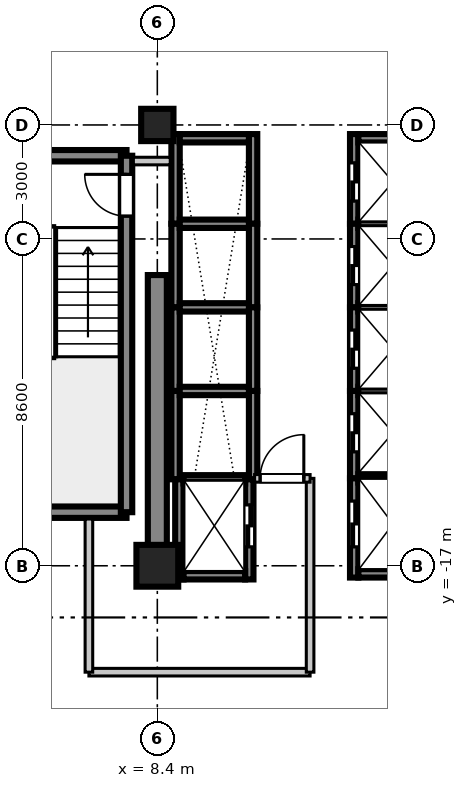
"""IFC4 building model, lengths in metres.
Left out: names, types, materials, properties, quantities, classifications, styles, units other than length and angle.
Written with IfcOpenShell. Run it as: python <this file> out.ifc"""

import sys

from ifc_helpers import new_model, si_unit, direction, frame, frame_2d, origin, origin_2d, place, context, subcontext, project, spatial, rectangle, extrude, source, transform, mapped, element, fill, save


model = new_model("IFC4")
c1 = context("Model", 3, precision=1e-05, world=origin(), true_north=direction((0.0, 1.0)))
c2 = subcontext(c1, "Body", "Model", "MODEL_VIEW")
j1 = project(units=[si_unit("LENGTHUNIT", "METRE"), si_unit("PLANEANGLEUNIT", "RADIAN")], contexts=[c1])
p1 = place(None, origin())
s1 = spatial("IfcSite", under=j1, at=p1, CompositionType="ELEMENT")
p2 = place(p1, origin())
s2 = spatial("IfcBuilding", under=s1, at=p2, CompositionType="ELEMENT")
p3 = place(p2, frame((0.0, 0.0, 149.0)))
s3 = spatial("IfcBuildingStorey", under=s2, at=p3, CompositionType="ELEMENT", Elevation=149.0)
m1 = source(origin(), c2, "Body", "SweptSolid", [
    extrude(rectangle(XDim=1.1, YDim=1.1, at=origin_2d()), origin(), (0.0, 0.0, 1.0), 3.605),
])
p4 = place(p3, frame((8.4, -17.0, 0.0), z_axis=(0.0, 0.0, 1.0), x_axis=(1.0, 0.0, 0.0)))
e1 = element("IfcColumn", 1, at=p4, inside=s3, PredefinedType="COLUMN", context=c2, shape_type="MappedRepresentation", body=[
    mapped(m1, transform((0.0, 0.0, 0.0), scale=1.0)),
])
m2 = source(origin(), c2, "Body", "SweptSolid", [
    extrude(rectangle(XDim=0.85, YDim=0.85, at=origin_2d()), origin(), (0.0, 0.0, 1.0), 3.605),
])
p5 = place(p3, frame((8.4, -5.4, 0.0), z_axis=(0.0, 0.0, 1.0), x_axis=(1.0, 0.0, 0.0)))
e2 = element("IfcColumn", 2, at=p5, inside=s3, PredefinedType="PILASTER", context=c2, shape_type="MappedRepresentation", body=[
    mapped(m2, transform((0.0, 0.0, 0.0), scale=1.0)),
])
m3 = source(origin(), c2, "Body", "SweptSolid", [
    extrude(rectangle(XDim=7.65, YDim=0.5, at=frame_2d((3.825, 0.0))), origin(), (0.0, 0.0, 1.0), 3.39),
])
p6 = place(p3, frame((8.4, -17.0, 0.0), z_axis=(0.0, 0.0, 1.0), x_axis=(0.0, 1.0, 0.0)))
e3 = element("IfcWall", 3, at=p6, inside=s3, PredefinedType="SHEAR", context=c2, shape_type="MappedRepresentation", body=[
    mapped(m3, transform((0.0, 0.0, 0.0), scale=1.0)),
])
m4 = source(origin(), c2, "Body", "SweptSolid", [
    extrude(rectangle(XDim=3.98, YDim=0.3, at=frame_2d((1.99, 0.0))), origin(), (0.0, 0.0, 1.0), 3.39),
])
for number, where, z_axis, x_axis in (
    (4, (3.61, -15.59, 0.0), (0.0, 0.0, 1.0), (1.0, 0.0, 0.0)),
    (5, (3.61, -6.21, 0.0), (0.0, 0.0, 1.0), (1.0, 0.0, 0.0)),
):
    element("IfcWall", number, at=place(p3, frame(where, z_axis=z_axis, x_axis=x_axis)), inside=s3, PredefinedType="SHEAR", context=c2, shape_type="MappedRepresentation", body=[
        mapped(m4, transform((0.0, 0.0, 0.0), scale=1.0)),
    ])
m5 = source(origin(), c2, "Body", "SweptSolid", [
    extrude(rectangle(XDim=9.38, YDim=0.3, at=frame_2d((4.69, 0.0))), origin(), (0.0, 0.0, 1.0), 3.39),
])
p7 = place(p3, frame((7.59, -15.59, 0.0), z_axis=(0.0, 0.0, 1.0), x_axis=(0.0, 1.0, 0.0)))
e6 = element("IfcWall", 6, at=p7, inside=s3, PredefinedType="SHEAR", context=c2, shape_type="MappedRepresentation", body=[
    mapped(m5, transform((0.0, 0.0, 0.0), scale=1.0)),
])
p8 = place(p7, frame((7.79, 0.0, 0.0)))
e7 = element("IfcOpeningElement", 7, at=p8, cuts=e6, PredefinedType="OPENING", context=c2, shape_type="SweptSolid", body=[
    extrude(rectangle(XDim=1.1, YDim=2.15, at=frame_2d((0.55, 1.075))), frame((0.0, 0.16, 0.0), z_axis=(0.0, -1.0, 0.0), x_axis=(1.0, 0.0, 0.0)), (0.0, 0.0, 1.0), 0.32),
])
m6 = source(origin(), c2, "Body", "SweptSolid", [
    extrude(rectangle(XDim=2.36, YDim=0.22, at=frame_2d((1.18, 0.0))), origin(), (0.0, 0.0, 1.0), 3.39),
])
p9 = place(p3, frame((13.58, -8.0, 0.0), z_axis=(0.0, 0.0, 1.0), x_axis=(0.0, 1.0, 0.0)))
e8 = element("IfcWall", 8, at=p9, inside=s3, PredefinedType="SHEAR", context=c2, shape_type="MappedRepresentation", body=[
    mapped(m6, transform((0.0, 0.0, 0.0), scale=1.0)),
])
p10 = place(p9, frame((0.6, 0.0, 0.0)))
e9 = element("IfcOpeningElement", 9, at=p10, cuts=e8, PredefinedType="OPENING", context=c2, shape_type="SweptSolid", body=[
    extrude(rectangle(XDim=1.0, YDim=2.2, at=frame_2d((0.5, 1.1))), frame((0.0, 0.12, 0.0), z_axis=(0.0, -1.0, 0.0), x_axis=(1.0, 0.0, 0.0)), (0.0, 0.0, 1.0), 0.24),
])
m7 = source(origin(), c2, "Body", "SweptSolid", [
    extrude(rectangle(XDim=1.82, YDim=0.22, at=frame_2d((0.91, 0.0))), origin(), (0.0, 0.0, 1.0), 3.39),
])
p11 = place(p3, frame((13.69, -5.75, 0.0), z_axis=(0.0, 0.0, 1.0), x_axis=(1.0, 0.0, 0.0)))
e10 = element("IfcWall", 10, at=p11, inside=s3, PredefinedType="SHEAR", context=c2, shape_type="MappedRepresentation", body=[
    mapped(m7, transform((0.0, 0.0, 0.0), scale=1.0)),
])
m8 = source(origin(), c2, "Body", "SweptSolid", [
    extrude(rectangle(XDim=2.2, YDim=0.22, at=frame_2d((1.1, 0.0))), origin(), (0.0, 0.0, 1.0), 3.39),
])
p12 = place(p3, frame((13.58, -10.2, 0.0), z_axis=(0.0, 0.0, 1.0), x_axis=(0.0, 1.0, 0.0)))
e11 = element("IfcWall", 11, at=p12, inside=s3, PredefinedType="SHEAR", context=c2, shape_type="MappedRepresentation", body=[
    mapped(m8, transform((0.0, 0.0, 0.0), scale=1.0)),
])
p13 = place(p12, frame((0.6, 0.0, 0.0)))
e12 = element("IfcOpeningElement", 12, at=p13, cuts=e11, PredefinedType="OPENING", context=c2, shape_type="SweptSolid", body=[
    extrude(rectangle(XDim=1.0, YDim=2.2, at=frame_2d((0.5, 1.1))), frame((0.0, 0.12, 0.0), z_axis=(0.0, -1.0, 0.0), x_axis=(1.0, 0.0, 0.0)), (0.0, 0.0, 1.0), 0.24),
])
m9 = source(origin(), c2, "Body", "SweptSolid", [
    extrude(rectangle(XDim=1.82, YDim=0.22, at=frame_2d((0.91, 0.0))), origin(), (0.0, 0.0, 1.0), 3.65),
])
p14 = place(p3, frame((13.69, -8.0, 0.0), z_axis=(0.0, 0.0, 1.0), x_axis=(1.0, 0.0, 0.0)))
e13 = element("IfcWall", 13, at=p14, inside=s3, PredefinedType="SHEAR", context=c2, shape_type="MappedRepresentation", body=[
    mapped(m9, transform((0.0, 0.0, 0.0), scale=1.0)),
])
p15 = place(p3, frame((13.58, -12.4, 0.0), z_axis=(0.0, 0.0, 1.0), x_axis=(0.0, 1.0, 0.0)))
e14 = element("IfcWall", 14, at=p15, inside=s3, PredefinedType="SHEAR", context=c2, shape_type="MappedRepresentation", body=[
    mapped(m8, transform((0.0, 0.0, 0.0), scale=1.0)),
])
p16 = place(p15, frame((0.6, 0.0, 0.0)))
e15 = element("IfcOpeningElement", 15, at=p16, cuts=e14, PredefinedType="OPENING", context=c2, shape_type="SweptSolid", body=[
    extrude(rectangle(XDim=1.0, YDim=2.2, at=frame_2d((0.5, 1.1))), frame((0.0, 0.12, 0.0), z_axis=(0.0, -1.0, 0.0), x_axis=(1.0, 0.0, 0.0)), (0.0, 0.0, 1.0), 0.24),
])
p17 = place(p3, frame((13.69, -10.2, 0.0), z_axis=(0.0, 0.0, 1.0), x_axis=(1.0, 0.0, 0.0)))
e16 = element("IfcWall", 16, at=p17, inside=s3, PredefinedType="SHEAR", context=c2, shape_type="MappedRepresentation", body=[
    mapped(m9, transform((0.0, 0.0, 0.0), scale=1.0)),
])
m10 = source(origin(), c2, "Body", "SweptSolid", [
    extrude(rectangle(XDim=2.3, YDim=0.22, at=frame_2d((1.15, 0.0))), origin(), (0.0, 0.0, 1.0), 3.39),
])
p18 = place(p3, frame((13.58, -14.7, 0.0), z_axis=(0.0, 0.0, 1.0), x_axis=(0.0, 1.0, 0.0)))
e17 = element("IfcWall", 17, at=p18, inside=s3, PredefinedType="SHEAR", context=c2, shape_type="MappedRepresentation", body=[
    mapped(m10, transform((0.0, 0.0, 0.0), scale=1.0)),
])
p19 = place(p18, frame((0.7, 0.0, 0.0)))
e18 = element("IfcOpeningElement", 18, at=p19, cuts=e17, PredefinedType="OPENING", context=c2, shape_type="SweptSolid", body=[
    extrude(rectangle(XDim=1.0, YDim=2.2, at=frame_2d((0.5, 1.1))), frame((0.0, 0.12, 0.0), z_axis=(0.0, -1.0, 0.0), x_axis=(1.0, 0.0, 0.0)), (0.0, 0.0, 1.0), 0.24),
])
p20 = place(p3, frame((13.69, -12.4, 0.0), z_axis=(0.0, 0.0, 1.0), x_axis=(1.0, 0.0, 0.0)))
e19 = element("IfcWall", 19, at=p20, inside=s3, PredefinedType="SHEAR", context=c2, shape_type="MappedRepresentation", body=[
    mapped(m9, transform((0.0, 0.0, 0.0), scale=1.0)),
])
for number, where, z_axis, x_axis in (
    (20, (8.88, -8.0, 0.0), (0.0, 0.0, 1.0), (0.0, 1.0, 0.0)),
    (21, (10.92, -8.0, 0.0), (0.0, 0.0, 1.0), (0.0, 1.0, 0.0)),
):
    element("IfcWall", number, at=place(p3, frame(where, z_axis=z_axis, x_axis=x_axis)), inside=s3, PredefinedType="SHEAR", context=c2, shape_type="MappedRepresentation", body=[
        mapped(m6, transform((0.0, 0.0, 0.0), scale=1.0)),
    ])
p21 = place(p3, frame((8.99, -5.75, 0.0), z_axis=(0.0, 0.0, 1.0), x_axis=(1.0, 0.0, 0.0)))
e22 = element("IfcWall", 22, at=p21, inside=s3, PredefinedType="SHEAR", context=c2, shape_type="MappedRepresentation", body=[
    mapped(m7, transform((0.0, 0.0, 0.0), scale=1.0)),
])
for number, where, z_axis, x_axis in (
    (23, (8.88, -10.2, 0.0), (0.0, 0.0, 1.0), (0.0, 1.0, 0.0)),
    (24, (10.92, -10.2, 0.0), (0.0, 0.0, 1.0), (0.0, 1.0, 0.0)),
):
    element("IfcWall", number, at=place(p3, frame(where, z_axis=z_axis, x_axis=x_axis)), inside=s3, PredefinedType="SHEAR", context=c2, shape_type="MappedRepresentation", body=[
        mapped(m8, transform((0.0, 0.0, 0.0), scale=1.0)),
    ])
p22 = place(p3, frame((8.99, -8.0, 0.0), z_axis=(0.0, 0.0, 1.0), x_axis=(1.0, 0.0, 0.0)))
e25 = element("IfcWall", 25, at=p22, inside=s3, PredefinedType="SHEAR", context=c2, shape_type="MappedRepresentation", body=[
    mapped(m9, transform((0.0, 0.0, 0.0), scale=1.0)),
])
for number, where, z_axis, x_axis in (
    (26, (8.88, -12.4, 0.0), (0.0, 0.0, 1.0), (0.0, 1.0, 0.0)),
    (27, (10.92, -12.4, 0.0), (0.0, 0.0, 1.0), (0.0, 1.0, 0.0)),
):
    element("IfcWall", number, at=place(p3, frame(where, z_axis=z_axis, x_axis=x_axis)), inside=s3, PredefinedType="SHEAR", context=c2, shape_type="MappedRepresentation", body=[
        mapped(m8, transform((0.0, 0.0, 0.0), scale=1.0)),
    ])
p23 = place(p3, frame((8.99, -10.2, 0.0), z_axis=(0.0, 0.0, 1.0), x_axis=(1.0, 0.0, 0.0)))
e28 = element("IfcWall", 28, at=p23, inside=s3, PredefinedType="SHEAR", context=c2, shape_type="MappedRepresentation", body=[
    mapped(m9, transform((0.0, 0.0, 0.0), scale=1.0)),
])
m11 = source(origin(), c2, "Body", "SweptSolid", [
    extrude(rectangle(XDim=2.325, YDim=0.22, at=frame_2d((1.163, 0.0))), origin(), (0.0, 0.0, 1.0), 3.39),
])
for number, where, z_axis, x_axis in (
    (29, (8.88, -14.725, 0.0), (0.0, 0.0, 1.0), (0.0, 1.0, 0.0)),
    (30, (10.92, -14.725, 0.0), (0.0, 0.0, 1.0), (0.0, 1.0, 0.0)),
):
    element("IfcWall", number, at=place(p3, frame(where, z_axis=z_axis, x_axis=x_axis)), inside=s3, PredefinedType="SHEAR", context=c2, shape_type="MappedRepresentation", body=[
        mapped(m11, transform((0.0, 0.0, 0.0), scale=1.0)),
    ])
p24 = place(p3, frame((8.99, -12.4, 0.0), z_axis=(0.0, 0.0, 1.0), x_axis=(1.0, 0.0, 0.0)))
e31 = element("IfcWall", 31, at=p24, inside=s3, PredefinedType="SHEAR", context=c2, shape_type="MappedRepresentation", body=[
    mapped(m9, transform((0.0, 0.0, 0.0), scale=1.0)),
])
m12 = source(origin(), c2, "Body", "SweptSolid", [
    extrude(rectangle(XDim=2.635, YDim=0.22, at=frame_2d((1.317, 0.0))), origin(), (0.0, 0.0, 1.0), 3.39),
])
p25 = place(p3, frame((8.98, -17.36, 0.0), z_axis=(0.0, 0.0, 1.0), x_axis=(0.0, 1.0, 0.0)))
e32 = element("IfcWall", 32, at=p25, inside=s3, PredefinedType="SHEAR", context=c2, shape_type="MappedRepresentation", body=[
    mapped(m12, transform((0.0, 0.0, 0.0), scale=1.0)),
])
p26 = place(p3, frame((10.82, -17.36, 0.0), z_axis=(0.0, 0.0, 1.0), x_axis=(0.0, 1.0, 0.0)))
e33 = element("IfcWall", 33, at=p26, inside=s3, PredefinedType="SHEAR", context=c2, shape_type="MappedRepresentation", body=[
    mapped(m12, transform((0.0, 0.0, 0.0), scale=1.0)),
])
p27 = place(p26, frame((0.86, 0.0, 0.0)))
e34 = element("IfcOpeningElement", 34, at=p27, cuts=e33, PredefinedType="OPENING", context=c2, shape_type="SweptSolid", body=[
    extrude(rectangle(XDim=1.1, YDim=2.2, at=frame_2d((0.55, 1.1))), frame((0.0, 0.12, 0.0), z_axis=(0.0, -1.0, 0.0), x_axis=(1.0, 0.0, 0.0)), (0.0, 0.0, 1.0), 0.24),
])
m13 = source(origin(), c2, "Body", "SweptSolid", [
    extrude(rectangle(XDim=1.62, YDim=0.22, at=frame_2d((0.81, 0.0))), origin(), (0.0, 0.0, 1.0), 3.39),
])
p28 = place(p3, frame((9.09, -17.25, 0.0), z_axis=(0.0, 0.0, 1.0), x_axis=(1.0, 0.0, 0.0)))
e35 = element("IfcWall", 35, at=p28, inside=s3, PredefinedType="SHEAR", context=c2, shape_type="MappedRepresentation", body=[
    mapped(m13, transform((0.0, 0.0, 0.0), scale=1.0)),
])
m14 = source(origin(), c2, "Body", "SweptSolid", [
    extrude(rectangle(XDim=1.62, YDim=0.22, at=frame_2d((0.81, 0.0))), origin(), (0.0, 0.0, 1.0), 3.65),
])
p29 = place(p3, frame((9.09, -14.725, 0.0), z_axis=(0.0, 0.0, 1.0), x_axis=(1.0, 0.0, 0.0)))
e36 = element("IfcWall", 36, at=p29, inside=s3, PredefinedType="SHEAR", context=c2, shape_type="MappedRepresentation", body=[
    mapped(m14, transform((0.0, 0.0, 0.0), scale=1.0)),
])
m15 = source(origin(), c2, "Body", "SweptSolid", [
    extrude(rectangle(XDim=2.61, YDim=0.22, at=frame_2d((1.305, 0.0))), origin(), (0.0, 0.0, 1.0), 3.39),
])
p30 = place(p3, frame((13.58, -17.31, 0.0), z_axis=(0.0, 0.0, 1.0), x_axis=(0.0, 1.0, 0.0)))
e37 = element("IfcWall", 37, at=p30, inside=s3, PredefinedType="SHEAR", context=c2, shape_type="MappedRepresentation", body=[
    mapped(m15, transform((0.0, 0.0, 0.0), scale=1.0)),
])
p31 = place(p30, frame((0.81, 0.0, 0.0)))
e38 = element("IfcOpeningElement", 38, at=p31, cuts=e37, PredefinedType="OPENING", context=c2, shape_type="SweptSolid", body=[
    extrude(rectangle(XDim=1.2, YDim=2.2, at=frame_2d((0.6, 1.1))), frame((0.0, 0.12, 0.0), z_axis=(0.0, -1.0, 0.0), x_axis=(1.0, 0.0, 0.0)), (0.0, 0.0, 1.0), 0.24),
])
p32 = place(p3, frame((13.69, -17.2, 0.0), z_axis=(0.0, 0.0, 1.0), x_axis=(1.0, 0.0, 0.0)))
e39 = element("IfcWall", 39, at=p32, inside=s3, PredefinedType="SHEAR", context=c2, shape_type="MappedRepresentation", body=[
    mapped(m7, transform((0.0, 0.0, 0.0), scale=1.0)),
])
p33 = place(p3, frame((13.69, -14.7, 0.0), z_axis=(0.0, 0.0, 1.0), x_axis=(1.0, 0.0, 0.0)))
e40 = element("IfcWall", 40, at=p33, inside=s3, PredefinedType="SHEAR", context=c2, shape_type="MappedRepresentation", body=[
    mapped(m9, transform((0.0, 0.0, 0.0), scale=1.0)),
])
m16 = source(origin(), c2, "Body", "SweptSolid", [
    extrude(rectangle(XDim=5.82, YDim=0.2, at=frame_2d((2.91, 0.0))), origin(), (0.0, 0.0, 1.0), 2.73),
])
p34 = place(p3, frame((6.6, -19.8, 0.0), z_axis=(0.0, 0.0, 1.0), x_axis=(1.0, 0.0, 0.0)))
e41 = element("IfcWall", 41, at=p34, inside=s3, PredefinedType="PARTITIONING", context=c2, shape_type="MappedRepresentation", body=[
    mapped(m16, transform((0.0, 0.0, 0.0), scale=1.0)),
])
m17 = source(origin(), c2, "Body", "SweptSolid", [
    extrude(rectangle(XDim=4.03, YDim=0.2, at=frame_2d((2.015, 0.0))), origin(), (0.0, 0.0, 1.0), 2.73),
])
p35 = place(p3, frame((6.6, -19.8, 0.0), z_axis=(0.0, 0.0, 1.0), x_axis=(0.0, 1.0, 0.0)))
e42 = element("IfcWall", 42, at=p35, inside=s3, PredefinedType="PARTITIONING", context=c2, shape_type="MappedRepresentation", body=[
    mapped(m17, transform((0.0, 0.0, 0.0), scale=1.0)),
])
m18 = source(origin(), c2, "Body", "SweptSolid", [
    extrude(rectangle(XDim=5.1, YDim=0.2, at=frame_2d((2.55, 0.0))), origin(), (0.0, 0.0, 1.0), 2.73),
])
p36 = place(p3, frame((12.42, -19.8, 0.0), z_axis=(0.0, 0.0, 1.0), x_axis=(0.0, 1.0, 0.0)))
e43 = element("IfcWall", 43, at=p36, inside=s3, PredefinedType="PARTITIONING", context=c2, shape_type="MappedRepresentation", body=[
    mapped(m18, transform((0.0, 0.0, 0.0), scale=1.0)),
])
m19 = source(origin(), c2, "Body", "SweptSolid", [
    extrude(rectangle(XDim=1.46, YDim=0.2, at=frame_2d((0.73, 0.0))), origin(), (0.0, 0.0, 1.0), 2.73),
])
p37 = place(p3, frame((10.96, -14.7, 0.0), z_axis=(0.0, 0.0, 1.0), x_axis=(1.0, 0.0, 0.0)))
e44 = element("IfcWall", 44, at=p37, inside=s3, PredefinedType="PARTITIONING", context=c2, shape_type="MappedRepresentation", body=[
    mapped(m19, transform((0.0, 0.0, 0.0), scale=1.0)),
])
p38 = place(p37, frame((0.145, 0.0, 0.0)))
e45 = element("IfcOpeningElement", 45, at=p38, cuts=e44, PredefinedType="OPENING", context=c2, shape_type="SweptSolid", body=[
    extrude(rectangle(XDim=1.15, YDim=2.15, at=frame_2d((0.575, 1.075))), frame((0.0, 0.11, 0.0), z_axis=(0.0, -1.0, 0.0), x_axis=(1.0, 0.0, 0.0)), (0.0, 0.0, 1.0), 0.22),
])
m20 = source(origin(), c2, "Body", "SweptSolid", [
    extrude(rectangle(XDim=0.97, YDim=0.2, at=frame_2d((0.485, 0.0))), origin(), (0.0, 0.0, 1.0), 2.73),
])
p39 = place(p3, frame((7.77, -6.35, 0.0), z_axis=(0.0, 0.0, 1.0), x_axis=(1.0, 0.0, 0.0)))
e46 = element("IfcWall", 46, at=p39, inside=s3, PredefinedType="PARTITIONING", context=c2, shape_type="MappedRepresentation", body=[
    mapped(m20, transform((0.0, 0.0, 0.0), scale=1.0)),
])
m21 = source(origin(), c2, "Body", "SweptSolid", [
    extrude(rectangle(XDim=1.1, YDim=2.15, at=frame_2d((0.55, 1.075))), frame((0.0, 0.025, 0.0), z_axis=(0.0, -1.0, 0.0), x_axis=(1.0, 0.0, 0.0)), (0.0, 0.0, 1.0), 0.05),
])
p40 = place(p8, origin())
e47 = element("IfcDoor", 47, at=p40, inside=s3, OperationType="SINGLE_SWING_RIGHT", PredefinedType="DOOR", context=c2, shape_type="MappedRepresentation", body=[
    mapped(m21, transform((0.0, 0.0, 0.0), scale=1.0)),
])
fill(e7, e47)
m22 = source(origin(), c2, "Body", "SweptSolid", [
    extrude(rectangle(XDim=1.0, YDim=2.2, at=frame_2d((0.5, 1.1))), frame((0.0, 0.025, 0.0), z_axis=(0.0, -1.0, 0.0), x_axis=(1.0, 0.0, 0.0)), (0.0, 0.0, 1.0), 0.05),
])
p41 = place(p10, origin())
e48 = element("IfcDoor", 48, at=p41, inside=s3, OperationType="DOUBLE_DOOR_SLIDING", PredefinedType="DOOR", context=c2, shape_type="MappedRepresentation", body=[
    mapped(m22, transform((0.0, 0.0, 0.0), scale=1.0)),
])
fill(e9, e48)
p42 = place(p13, origin())
e49 = element("IfcDoor", 49, at=p42, inside=s3, OperationType="DOUBLE_DOOR_SLIDING", PredefinedType="DOOR", context=c2, shape_type="MappedRepresentation", body=[
    mapped(m22, transform((0.0, 0.0, 0.0), scale=1.0)),
])
fill(e12, e49)
p43 = place(p16, origin())
e50 = element("IfcDoor", 50, at=p43, inside=s3, OperationType="DOUBLE_DOOR_SLIDING", PredefinedType="DOOR", context=c2, shape_type="MappedRepresentation", body=[
    mapped(m22, transform((0.0, 0.0, 0.0), scale=1.0)),
])
fill(e15, e50)
p44 = place(p19, origin())
e51 = element("IfcDoor", 51, at=p44, inside=s3, OperationType="DOUBLE_DOOR_SLIDING", PredefinedType="DOOR", context=c2, shape_type="MappedRepresentation", body=[
    mapped(m22, transform((0.0, 0.0, 0.0), scale=1.0)),
])
fill(e18, e51)
m23 = source(origin(), c2, "Body", "SweptSolid", [
    extrude(rectangle(XDim=1.1, YDim=2.2, at=frame_2d((0.55, 1.1))), frame((0.0, 0.025, 0.0), z_axis=(0.0, -1.0, 0.0), x_axis=(1.0, 0.0, 0.0)), (0.0, 0.0, 1.0), 0.05),
])
p45 = place(p27, frame((1.1, 0.0, 0.0), z_axis=(0.0, 0.0, 1.0), x_axis=(-1.0, 0.0, 0.0)))
e52 = element("IfcDoor", 52, at=p45, inside=s3, OperationType="DOUBLE_DOOR_SLIDING", PredefinedType="DOOR", context=c2, shape_type="MappedRepresentation", body=[
    mapped(m23, transform((0.0, 0.0, 0.0), scale=1.0)),
])
fill(e34, e52)
m24 = source(origin(), c2, "Body", "SweptSolid", [
    extrude(rectangle(XDim=1.2, YDim=2.2, at=frame_2d((0.6, 1.1))), frame((0.0, 0.025, 0.0), z_axis=(0.0, -1.0, 0.0), x_axis=(1.0, 0.0, 0.0)), (0.0, 0.0, 1.0), 0.05),
])
p46 = place(p31, origin())
e53 = element("IfcDoor", 53, at=p46, inside=s3, OperationType="DOUBLE_DOOR_SLIDING", PredefinedType="DOOR", context=c2, shape_type="MappedRepresentation", body=[
    mapped(m24, transform((0.0, 0.0, 0.0), scale=1.0)),
])
fill(e38, e53)
m25 = source(origin(), c2, "Body", "SweptSolid", [
    extrude(rectangle(XDim=1.15, YDim=2.15, at=frame_2d((0.575, 1.075))), frame((0.0, 0.025, 0.0), z_axis=(0.0, -1.0, 0.0), x_axis=(1.0, 0.0, 0.0)), (0.0, 0.0, 1.0), 0.05),
])
p47 = place(p38, origin())
e54 = element("IfcDoor", 54, at=p47, inside=s3, OperationType="SINGLE_SWING_RIGHT", PredefinedType="DOOR", context=c2, shape_type="MappedRepresentation", body=[
    mapped(m25, transform((0.0, 0.0, 0.0), scale=1.0)),
])
fill(e45, e54)
save(model, sys.argv[1])
